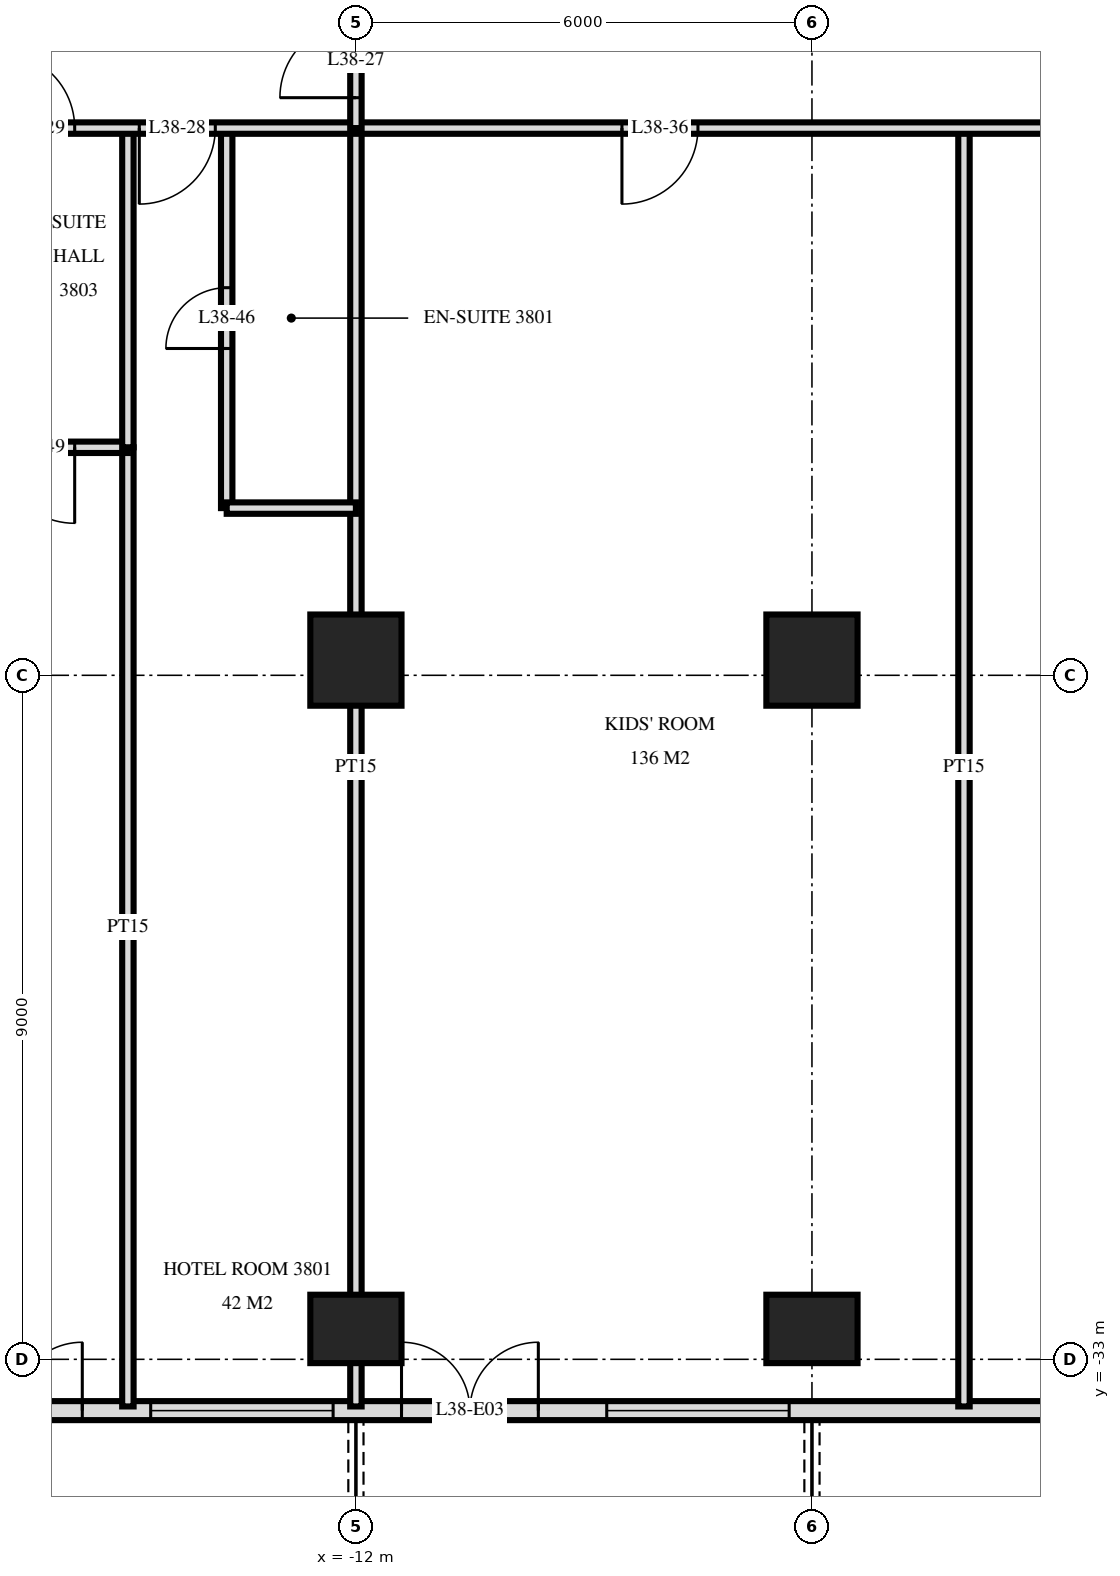
"""IFC4 building model, lengths in metres.
Left out: names, types, materials, properties, quantities, classifications, styles, units other than length and angle.
Written with IfcOpenShell. Run it as: python <this file> out.ifc"""

import sys

from ifc_helpers import new_model, si_unit, direction, frame, frame_2d, origin, origin_2d, place, context, subcontext, project, spatial, rectangle, extrude, element, fill, save


model = new_model("IFC4")
c1 = context("Model", 3, precision=1e-05, world=origin(), true_north=direction((0.0, 1.0)))
c2 = subcontext(c1, "Body", "Model", "MODEL_VIEW")
j1 = project(units=[si_unit("LENGTHUNIT", "METRE"), si_unit("PLANEANGLEUNIT", "RADIAN")], contexts=[c1])
p1 = place(None, origin())
s1 = spatial("IfcSite", under=j1, at=p1, CompositionType="ELEMENT")
p2 = place(p1, origin())
s2 = spatial("IfcBuilding", under=s1, at=p2, CompositionType="ELEMENT")
p3 = place(p2, frame((0.0, 0.0, 148.8)))
s3 = spatial("IfcBuildingStorey", under=s2, at=p3, CompositionType="ELEMENT", Elevation=148.8)
p4 = place(p3, frame((-12.0, -32.6, 0.0), z_axis=(0.0, 0.0, 1.0), x_axis=(1.0, 0.0, 0.0)))
e1 = element("IfcColumn", 1, at=p4, inside=s3, PredefinedType="COLUMN", context=c2, shape_type="SweptSolid", body=[
    extrude(rectangle(XDim=1.2, YDim=0.9, at=origin_2d()), origin(), (0.0, 0.0, 1.0), 3.6),
])
p5 = place(p3, frame((-12.0, -23.8, 0.0), z_axis=(0.0, 0.0, 1.0), x_axis=(1.0, 0.0, 0.0)))
e2 = element("IfcColumn", 2, at=p5, inside=s3, PredefinedType="COLUMN", context=c2, shape_type="SweptSolid", body=[
    extrude(rectangle(XDim=1.2, YDim=1.2, at=origin_2d()), origin(), (0.0, 0.0, 1.0), 3.6),
])
p6 = place(p3, frame((-6.0, -32.6, 0.0), z_axis=(0.0, 0.0, 1.0), x_axis=(1.0, 0.0, 0.0)))
e3 = element("IfcColumn", 3, at=p6, inside=s3, PredefinedType="COLUMN", context=c2, shape_type="SweptSolid", body=[
    extrude(rectangle(XDim=1.2, YDim=0.9, at=origin_2d()), origin(), (0.0, 0.0, 1.0), 3.6),
])
p7 = place(p3, frame((-6.0, -23.8, 0.0), z_axis=(0.0, 0.0, 1.0), x_axis=(1.0, 0.0, 0.0)))
e4 = element("IfcColumn", 4, at=p7, inside=s3, PredefinedType="COLUMN", context=c2, shape_type="SweptSolid", body=[
    extrude(rectangle(XDim=1.2, YDim=1.2, at=origin_2d()), origin(), (0.0, 0.0, 1.0), 3.6),
])
p8 = place(p3, frame((-23.675, -33.675, 0.0), z_axis=(0.0, 0.0, 1.0), x_axis=(1.0, 0.0, 0.0)))
e5 = element("IfcWall", 5, at=p8, inside=s3, PredefinedType="SOLIDWALL", context=c2, shape_type="SweptSolid", body=[
    extrude(rectangle(XDim=47.351, YDim=0.25, at=frame_2d((23.675, 0.0))), origin(), (0.0, 0.0, 1.0), 3.32),
])
p9 = place(p8, frame((3.425, 0.0, 0.0)))
e6 = element("IfcOpeningElement", 6, at=p9, cuts=e5, PredefinedType="OPENING", context=c2, shape_type="SweptSolid", body=[
    extrude(rectangle(XDim=1.8, YDim=2.4, at=frame_2d((0.9, 1.2))), frame((0.0, 0.135, 0.0), z_axis=(0.0, -1.0, 0.0), x_axis=(1.0, 0.0, 0.0)), (0.0, 0.0, 1.0), 0.27),
])
p10 = place(p8, frame((6.275, 0.0, 0.0)))
e7 = element("IfcOpeningElement", 7, at=p10, cuts=e5, PredefinedType="OPENING", context=c2, shape_type="SweptSolid", body=[
    extrude(rectangle(XDim=1.8, YDim=2.4, at=frame_2d((0.9, 1.2))), frame((0.0, 0.135, 0.0), z_axis=(0.0, -1.0, 0.0), x_axis=(1.0, 0.0, 0.0)), (0.0, 0.0, 1.0), 0.27),
])
p11 = place(p8, frame((8.975, 0.0, 0.3)))
e8 = element("IfcOpeningElement", 8, at=p11, cuts=e5, PredefinedType="OPENING", context=c2, shape_type="SweptSolid", body=[
    extrude(rectangle(XDim=2.4, YDim=2.1, at=frame_2d((1.2, 1.05))), frame((0.0, 0.135, 0.0), z_axis=(0.0, -1.0, 0.0), x_axis=(1.0, 0.0, 0.0)), (0.0, 0.0, 1.0), 0.27),
])
p12 = place(p8, frame((12.275, 0.0, 0.0)))
e9 = element("IfcOpeningElement", 9, at=p12, cuts=e5, PredefinedType="OPENING", context=c2, shape_type="SweptSolid", body=[
    extrude(rectangle(XDim=1.8, YDim=2.4, at=frame_2d((0.9, 1.2))), frame((0.0, 0.135, 0.0), z_axis=(0.0, -1.0, 0.0), x_axis=(1.0, 0.0, 0.0)), (0.0, 0.0, 1.0), 0.27),
])
p13 = place(p8, frame((14.975, 0.0, 0.3)))
e10 = element("IfcOpeningElement", 10, at=p13, cuts=e5, PredefinedType="OPENING", context=c2, shape_type="SweptSolid", body=[
    extrude(rectangle(XDim=2.4, YDim=2.1, at=frame_2d((1.2, 1.05))), frame((0.0, 0.135, 0.0), z_axis=(0.0, -1.0, 0.0), x_axis=(1.0, 0.0, 0.0)), (0.0, 0.0, 1.0), 0.27),
])
p14 = place(p8, frame((21.275, 0.0, 0.0)))
e11 = element("IfcOpeningElement", 11, at=p14, cuts=e5, PredefinedType="OPENING", context=c2, shape_type="SweptSolid", body=[
    extrude(rectangle(XDim=1.8, YDim=2.4, at=frame_2d((0.9, 1.2))), frame((0.0, 0.135, 0.0), z_axis=(0.0, -1.0, 0.0), x_axis=(1.0, 0.0, 0.0)), (0.0, 0.0, 1.0), 0.27),
])
p15 = place(p8, frame((24.275, 0.0, 0.0)))
e12 = element("IfcOpeningElement", 12, at=p15, cuts=e5, PredefinedType="OPENING", context=c2, shape_type="SweptSolid", body=[
    extrude(rectangle(XDim=1.8, YDim=2.4, at=frame_2d((0.9, 1.2))), frame((0.0, 0.135, 0.0), z_axis=(0.0, -1.0, 0.0), x_axis=(1.0, 0.0, 0.0)), (0.0, 0.0, 1.0), 0.27),
])
p16 = place(p8, frame((30.275, 0.0, 0.0)))
e13 = element("IfcOpeningElement", 13, at=p16, cuts=e5, PredefinedType="OPENING", context=c2, shape_type="SweptSolid", body=[
    extrude(rectangle(XDim=1.8, YDim=2.4, at=frame_2d((0.9, 1.2))), frame((0.0, 0.135, 0.0), z_axis=(0.0, -1.0, 0.0), x_axis=(1.0, 0.0, 0.0)), (0.0, 0.0, 1.0), 0.27),
])
p17 = place(p8, frame((32.975, 0.0, 0.3)))
e14 = element("IfcOpeningElement", 14, at=p17, cuts=e5, PredefinedType="OPENING", context=c2, shape_type="SweptSolid", body=[
    extrude(rectangle(XDim=2.4, YDim=2.1, at=frame_2d((1.2, 1.05))), frame((0.0, 0.135, 0.0), z_axis=(0.0, -1.0, 0.0), x_axis=(1.0, 0.0, 0.0)), (0.0, 0.0, 1.0), 0.27),
])
p18 = place(p8, frame((36.275, 0.0, 0.0)))
e15 = element("IfcOpeningElement", 15, at=p18, cuts=e5, PredefinedType="OPENING", context=c2, shape_type="SweptSolid", body=[
    extrude(rectangle(XDim=1.8, YDim=2.4, at=frame_2d((0.9, 1.2))), frame((0.0, 0.135, 0.0), z_axis=(0.0, -1.0, 0.0), x_axis=(1.0, 0.0, 0.0)), (0.0, 0.0, 1.0), 0.27),
])
p19 = place(p8, frame((38.975, 0.0, 0.3)))
e16 = element("IfcOpeningElement", 16, at=p19, cuts=e5, PredefinedType="OPENING", context=c2, shape_type="SweptSolid", body=[
    extrude(rectangle(XDim=2.4, YDim=2.1, at=frame_2d((1.2, 1.05))), frame((0.0, 0.135, 0.0), z_axis=(0.0, -1.0, 0.0), x_axis=(1.0, 0.0, 0.0)), (0.0, 0.0, 1.0), 0.27),
])
p20 = place(p8, frame((42.275, 0.0, 0.0)))
e17 = element("IfcOpeningElement", 17, at=p20, cuts=e5, PredefinedType="OPENING", context=c2, shape_type="SweptSolid", body=[
    extrude(rectangle(XDim=1.8, YDim=2.4, at=frame_2d((0.9, 1.2))), frame((0.0, 0.135, 0.0), z_axis=(0.0, -1.0, 0.0), x_axis=(1.0, 0.0, 0.0)), (0.0, 0.0, 1.0), 0.27),
])
p21 = place(p8, frame((45.125, 0.0, 0.3)))
e18 = element("IfcOpeningElement", 18, at=p21, cuts=e5, PredefinedType="OPENING", context=c2, shape_type="SweptSolid", body=[
    extrude(rectangle(XDim=1.8, YDim=2.1, at=frame_2d((0.9, 1.05))), frame((0.0, 0.135, 0.0), z_axis=(0.0, -1.0, 0.0), x_axis=(1.0, 0.0, 0.0)), (0.0, 0.0, 1.0), 0.27),
])
p22 = place(p3, frame((-4.0, -33.62, 0.0), z_axis=(0.0, 0.0, 1.0), x_axis=(0.0, 1.0, 0.0)))
e19 = element("IfcWall", 19, at=p22, inside=s3, PredefinedType="PARTITIONING", context=c2, shape_type="SweptSolid", body=[
    extrude(rectangle(XDim=16.82, YDim=0.15, at=frame_2d((8.41, 0.0))), origin(), (0.0, 0.0, 1.0), 3.32),
])
p23 = place(p3, frame((-12.0, -16.8, 0.0), z_axis=(0.0, 0.0, 1.0), x_axis=(0.0, 1.0, 0.0)))
e20 = element("IfcWall", 20, at=p23, inside=s3, PredefinedType="PARTITIONING", context=c2, shape_type="SweptSolid", body=[
    extrude(rectangle(XDim=1.75, YDim=0.15, at=frame_2d((0.875, 0.0))), origin(), (0.0, 0.0, 1.0), 3.32),
])
p24 = place(p23, frame((0.4, 0.0, 0.0)))
e21 = element("IfcOpeningElement", 21, at=p24, cuts=e20, PredefinedType="OPENING", context=c2, shape_type="SweptSolid", body=[
    extrude(rectangle(XDim=1.0, YDim=2.1, at=frame_2d((0.5, 1.05))), frame((0.0, 0.085, 0.0), z_axis=(0.0, -1.0, 0.0), x_axis=(1.0, 0.0, 0.0)), (0.0, 0.0, 1.0), 0.17),
])
p25 = place(p3, frame((-12.0, -33.62, 0.0), z_axis=(0.0, 0.0, 1.0), x_axis=(0.0, 1.0, 0.0)))
e22 = element("IfcWall", 22, at=p25, inside=s3, PredefinedType="PARTITIONING", context=c2, shape_type="SweptSolid", body=[
    extrude(rectangle(XDim=16.82, YDim=0.15, at=frame_2d((8.41, 0.0))), origin(), (0.0, 0.0, 1.0), 3.32),
])
p26 = place(p3, frame((-13.7, -21.8, 0.0), z_axis=(0.0, 0.0, 1.0), x_axis=(0.0, 1.0, 0.0)))
e23 = element("IfcWall", 23, at=p26, inside=s3, PredefinedType="PARTITIONING", context=c2, shape_type="SweptSolid", body=[
    extrude(rectangle(XDim=5.0, YDim=0.15, at=frame_2d((2.5, 0.0))), origin(), (0.0, 0.0, 1.0), 3.32),
])
p27 = place(p26, frame((2.1, 0.0, 0.0)))
e24 = element("IfcOpeningElement", 24, at=p27, cuts=e23, PredefinedType="OPENING", context=c2, shape_type="SweptSolid", body=[
    extrude(rectangle(XDim=0.8, YDim=2.1, at=frame_2d((0.4, 1.05))), frame((0.0, 0.085, 0.0), z_axis=(0.0, -1.0, 0.0), x_axis=(1.0, 0.0, 0.0)), (0.0, 0.0, 1.0), 0.17),
])
p28 = place(p3, frame((-15.0, -21.0, 0.0), z_axis=(0.0, 0.0, 1.0), x_axis=(0.0, 1.0, 0.0)))
e25 = element("IfcWall", 25, at=p28, inside=s3, PredefinedType="PARTITIONING", context=c2, shape_type="SweptSolid", body=[
    extrude(rectangle(XDim=4.2, YDim=0.15, at=frame_2d((2.1, 0.0))), origin(), (0.0, 0.0, 1.0), 3.32),
])
p29 = place(p3, frame((-15.0, -33.62, 0.0), z_axis=(0.0, 0.0, 1.0), x_axis=(0.0, 1.0, 0.0)))
e26 = element("IfcWall", 26, at=p29, inside=s3, PredefinedType="PARTITIONING", context=c2, shape_type="SweptSolid", body=[
    extrude(rectangle(XDim=12.62, YDim=0.15, at=frame_2d((6.31, 0.0))), origin(), (0.0, 0.0, 1.0), 3.32),
])
p30 = place(p3, frame((-13.7, -21.8, 0.0), z_axis=(0.0, 0.0, 1.0), x_axis=(1.0, 0.0, 0.0)))
e27 = element("IfcWall", 27, at=p30, inside=s3, PredefinedType="PARTITIONING", context=c2, shape_type="SweptSolid", body=[
    extrude(rectangle(XDim=1.7, YDim=0.15, at=frame_2d((0.85, 0.0))), origin(), (0.0, 0.0, 1.0), 3.32),
])
p31 = place(p3, frame((-17.4, -21.0, 0.0), z_axis=(0.0, 0.0, 1.0), x_axis=(1.0, 0.0, 0.0)))
e28 = element("IfcWall", 28, at=p31, inside=s3, PredefinedType="PARTITIONING", context=c2, shape_type="SweptSolid", body=[
    extrude(rectangle(XDim=2.4, YDim=0.15, at=frame_2d((1.2, 0.0))), origin(), (0.0, 0.0, 1.0), 3.32),
])
p32 = place(p31, frame((0.7, 0.0, 0.0)))
e29 = element("IfcOpeningElement", 29, at=p32, cuts=e28, PredefinedType="OPENING", context=c2, shape_type="SweptSolid", body=[
    extrude(rectangle(XDim=1.0, YDim=2.1, at=frame_2d((0.5, 1.05))), frame((0.0, 0.085, 0.0), z_axis=(0.0, -1.0, 0.0), x_axis=(1.0, 0.0, 0.0)), (0.0, 0.0, 1.0), 0.17),
])
p33 = place(p3, frame((-28.02, -16.8, 0.0), z_axis=(0.0, 0.0, 1.0), x_axis=(1.0, 0.0, 0.0)))
e30 = element("IfcWall", 30, at=p33, inside=s3, PredefinedType="PARTITIONING", context=c2, shape_type="SweptSolid", body=[
    extrude(rectangle(XDim=56.04, YDim=0.15, at=frame_2d((28.02, 0.0))), origin(), (0.0, 0.0, 1.0), 3.32),
])
p34 = place(p33, frame((13.17, 0.0, 0.0)))
e31 = element("IfcOpeningElement", 31, at=p34, cuts=e30, PredefinedType="OPENING", context=c2, shape_type="SweptSolid", body=[
    extrude(rectangle(XDim=1.0, YDim=2.1, at=frame_2d((0.5, 1.05))), frame((0.0, 0.085, 0.0), z_axis=(0.0, -1.0, 0.0), x_axis=(1.0, 0.0, 0.0)), (0.0, 0.0, 1.0), 0.17),
])
p35 = place(p33, frame((11.32, 0.0, 0.0)))
e32 = element("IfcOpeningElement", 32, at=p35, cuts=e30, PredefinedType="OPENING", context=c2, shape_type="SweptSolid", body=[
    extrude(rectangle(XDim=1.0, YDim=2.1, at=frame_2d((0.5, 1.05))), frame((0.0, 0.085, 0.0), z_axis=(0.0, -1.0, 0.0), x_axis=(1.0, 0.0, 0.0)), (0.0, 0.0, 1.0), 0.17),
])
p36 = place(p33, frame((41.87, 0.0, 0.0)))
e33 = element("IfcOpeningElement", 33, at=p36, cuts=e30, PredefinedType="OPENING", context=c2, shape_type="SweptSolid", body=[
    extrude(rectangle(XDim=1.0, YDim=2.1, at=frame_2d((0.5, 1.05))), frame((0.0, 0.085, 0.0), z_axis=(0.0, -1.0, 0.0), x_axis=(1.0, 0.0, 0.0)), (0.0, 0.0, 1.0), 0.17),
])
p37 = place(p33, frame((43.72, 0.0, 0.0)))
e34 = element("IfcOpeningElement", 34, at=p37, cuts=e30, PredefinedType="OPENING", context=c2, shape_type="SweptSolid", body=[
    extrude(rectangle(XDim=1.0, YDim=2.1, at=frame_2d((0.5, 1.05))), frame((0.0, 0.085, 0.0), z_axis=(0.0, -1.0, 0.0), x_axis=(1.0, 0.0, 0.0)), (0.0, 0.0, 1.0), 0.17),
])
p38 = place(p33, frame((19.52, 0.0, 0.0)))
e35 = element("IfcOpeningElement", 35, at=p38, cuts=e30, PredefinedType="OPENING", context=c2, shape_type="SweptSolid", body=[
    extrude(rectangle(XDim=1.0, YDim=2.1, at=frame_2d((0.5, 1.05))), frame((0.0, 0.085, 0.0), z_axis=(0.0, -1.0, 0.0), x_axis=(1.0, 0.0, 0.0)), (0.0, 0.0, 1.0), 0.17),
])
p39 = place(p33, frame((27.52, 0.0, 0.0)))
e36 = element("IfcOpeningElement", 36, at=p39, cuts=e30, PredefinedType="OPENING", context=c2, shape_type="SweptSolid", body=[
    extrude(rectangle(XDim=1.0, YDim=2.1, at=frame_2d((0.5, 1.05))), frame((0.0, 0.085, 0.0), z_axis=(0.0, -1.0, 0.0), x_axis=(1.0, 0.0, 0.0)), (0.0, 0.0, 1.0), 0.17),
])
p40 = place(p33, frame((35.52, 0.0, 0.0)))
e37 = element("IfcOpeningElement", 37, at=p40, cuts=e30, PredefinedType="OPENING", context=c2, shape_type="SweptSolid", body=[
    extrude(rectangle(XDim=1.0, YDim=2.1, at=frame_2d((0.5, 1.05))), frame((0.0, 0.085, 0.0), z_axis=(0.0, -1.0, 0.0), x_axis=(1.0, 0.0, 0.0)), (0.0, 0.0, 1.0), 0.17),
])
p41 = place(p10, origin())
e38 = element("IfcDoor", 38, at=p41, inside=s3, OperationType="DOUBLE_DOOR_SINGLE_SWING", PredefinedType="DOOR", context=c2, shape_type="SweptSolid", body=[
    extrude(rectangle(XDim=1.8, YDim=2.4, at=frame_2d((0.9, 1.2))), frame((0.0, 0.025, 0.0), z_axis=(0.0, -1.0, 0.0), x_axis=(1.0, 0.0, 0.0)), (0.0, 0.0, 1.0), 0.05),
])
fill(e7, e38)
p42 = place(p11, origin())
e39 = element("IfcWindow", 39, at=p42, inside=s3, PartitioningType="SINGLE_PANEL", PredefinedType="WINDOW", context=c2, shape_type="SweptSolid", body=[
    extrude(rectangle(XDim=2.4, YDim=2.1, at=frame_2d((1.2, 1.05))), frame((0.0, 0.03, 0.0), z_axis=(0.0, -1.0, 0.0), x_axis=(1.0, 0.0, 0.0)), (0.0, 0.0, 1.0), 0.06),
])
fill(e8, e39)
p43 = place(p12, origin())
e40 = element("IfcDoor", 40, at=p43, inside=s3, OperationType="DOUBLE_DOOR_SINGLE_SWING", PredefinedType="DOOR", context=c2, shape_type="SweptSolid", body=[
    extrude(rectangle(XDim=1.8, YDim=2.4, at=frame_2d((0.9, 1.2))), frame((0.0, 0.025, 0.0), z_axis=(0.0, -1.0, 0.0), x_axis=(1.0, 0.0, 0.0)), (0.0, 0.0, 1.0), 0.05),
])
fill(e9, e40)
p44 = place(p13, origin())
e41 = element("IfcWindow", 41, at=p44, inside=s3, PartitioningType="SINGLE_PANEL", PredefinedType="WINDOW", context=c2, shape_type="SweptSolid", body=[
    extrude(rectangle(XDim=2.4, YDim=2.1, at=frame_2d((1.2, 1.05))), frame((0.0, 0.03, 0.0), z_axis=(0.0, -1.0, 0.0), x_axis=(1.0, 0.0, 0.0)), (0.0, 0.0, 1.0), 0.06),
])
fill(e10, e41)
p45 = place(p24, origin())
e42 = element("IfcDoor", 42, at=p45, inside=s3, OperationType="SINGLE_SWING_RIGHT", PredefinedType="DOOR", context=c2, shape_type="SweptSolid", body=[
    extrude(rectangle(XDim=1.0, YDim=2.1, at=frame_2d((0.5, 1.05))), frame((0.0, 0.025, 0.0), z_axis=(0.0, -1.0, 0.0), x_axis=(1.0, 0.0, 0.0)), (0.0, 0.0, 1.0), 0.05),
])
fill(e21, e42)
p46 = place(p34, frame((0.5, 0.0, 0.0), z_axis=(0.0, 0.0, 1.0), x_axis=(-1.0, 0.0, 0.0)))
e43 = element("IfcDoor", 43, at=p46, inside=s3, OperationType="SINGLE_SWING_LEFT", PredefinedType="DOOR", context=c2, shape_type="SweptSolid", body=[
    extrude(rectangle(XDim=1.0, YDim=2.1, at=frame_2d((0.0, 1.05))), frame((0.0, -0.025, 0.0), z_axis=(0.0, 1.0, 0.0), x_axis=(-1.0, 0.0, 0.0)), (0.0, 0.0, 1.0), 0.05),
])
fill(e31, e43)
p47 = place(p35, origin())
e44 = element("IfcDoor", 44, at=p47, inside=s3, OperationType="SINGLE_SWING_RIGHT", PredefinedType="DOOR", context=c2, shape_type="SweptSolid", body=[
    extrude(rectangle(XDim=1.0, YDim=2.1, at=frame_2d((0.5, 1.05))), frame((0.0, 0.025, 0.0), z_axis=(0.0, -1.0, 0.0), x_axis=(1.0, 0.0, 0.0)), (0.0, 0.0, 1.0), 0.05),
])
fill(e32, e44)
p48 = place(p38, frame((0.5, 0.0, 0.0), z_axis=(0.0, 0.0, 1.0), x_axis=(-1.0, 0.0, 0.0)))
e45 = element("IfcDoor", 45, at=p48, inside=s3, OperationType="SINGLE_SWING_LEFT", PredefinedType="DOOR", context=c2, shape_type="SweptSolid", body=[
    extrude(rectangle(XDim=1.0, YDim=2.1, at=frame_2d((0.0, 1.05))), frame((0.0, -0.025, 0.0), z_axis=(0.0, 1.0, 0.0), x_axis=(-1.0, 0.0, 0.0)), (0.0, 0.0, 1.0), 0.05),
])
fill(e35, e45)
p49 = place(p27, origin())
e46 = element("IfcDoor", 46, at=p49, inside=s3, OperationType="SINGLE_SWING_RIGHT", PredefinedType="DOOR", context=c2, shape_type="SweptSolid", body=[
    extrude(rectangle(XDim=0.8, YDim=2.1, at=frame_2d((0.4, 1.05))), frame((0.0, 0.025, 0.0), z_axis=(0.0, -1.0, 0.0), x_axis=(1.0, 0.0, 0.0)), (0.0, 0.0, 1.0), 0.05),
])
fill(e24, e46)
p50 = place(p32, frame((0.5, 0.0, 0.0), z_axis=(0.0, 0.0, 1.0), x_axis=(-1.0, 0.0, 0.0)))
e47 = element("IfcDoor", 47, at=p50, inside=s3, OperationType="SINGLE_SWING_RIGHT", PredefinedType="DOOR", context=c2, shape_type="SweptSolid", body=[
    extrude(rectangle(XDim=1.0, YDim=2.1, at=frame_2d((0.0, 1.05))), frame((0.0, -0.025, 0.0), z_axis=(0.0, 1.0, 0.0), x_axis=(-1.0, 0.0, 0.0)), (0.0, 0.0, 1.0), 0.05),
])
fill(e29, e47)
save(model, sys.argv[1])
